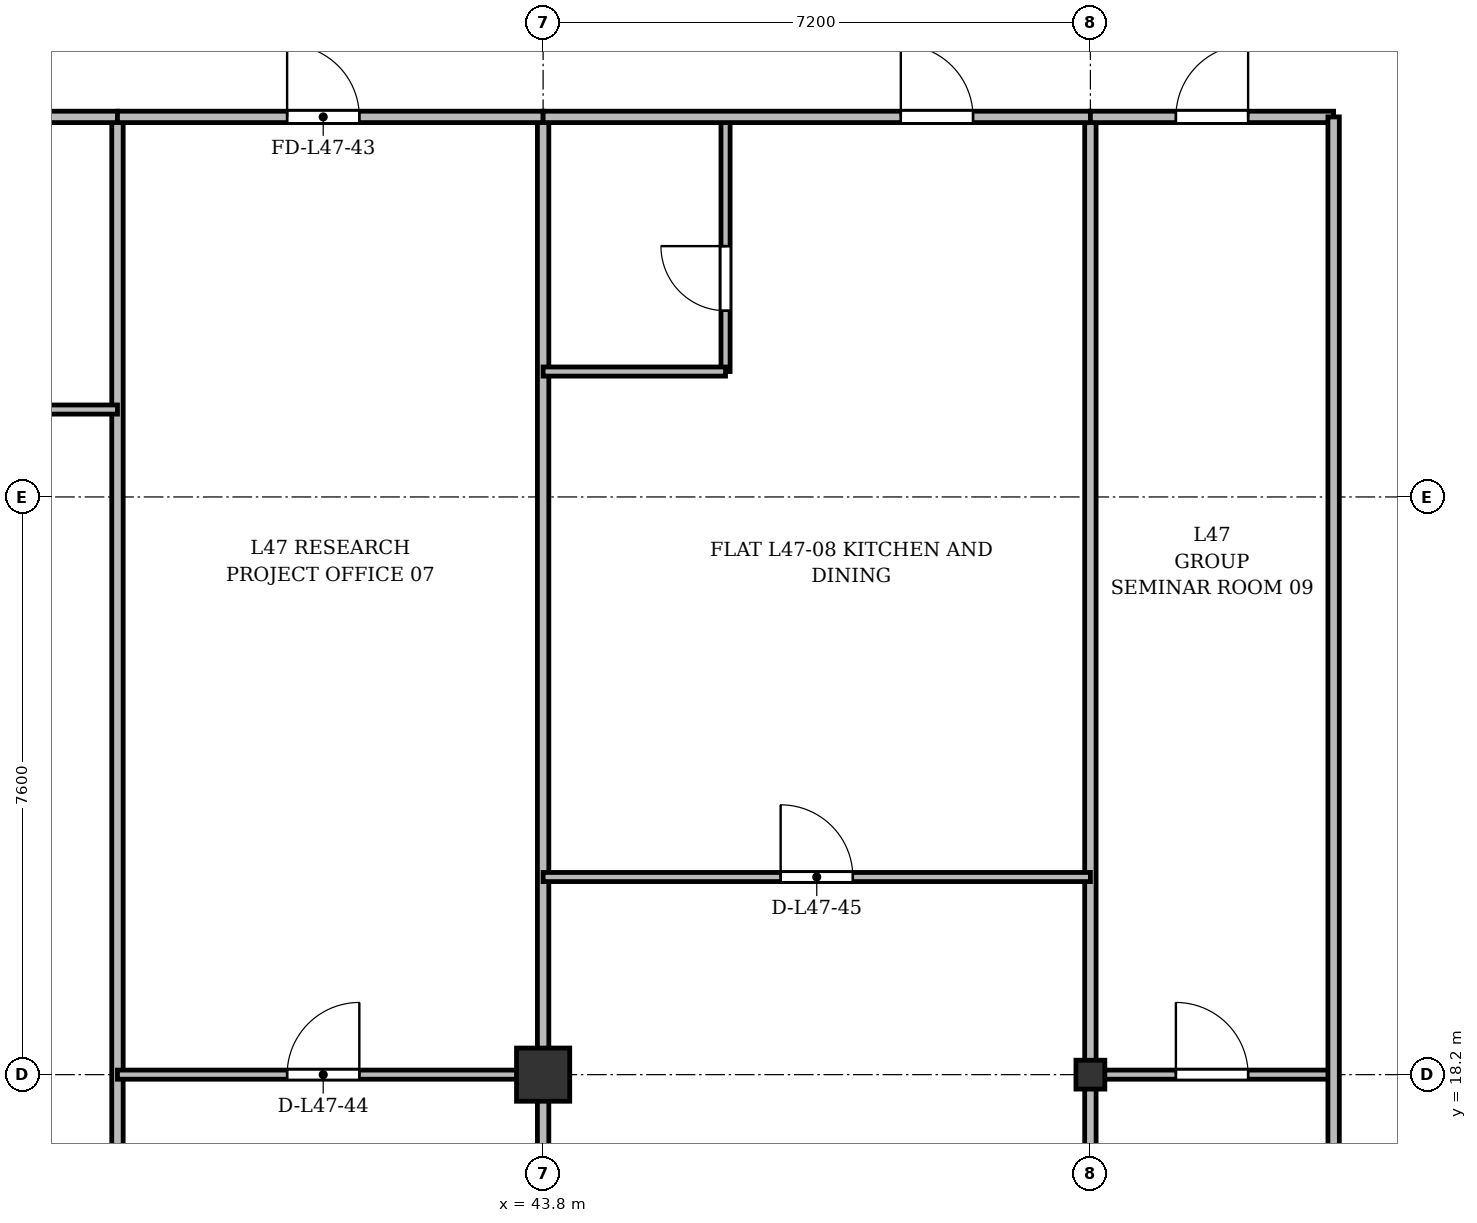
"""IFC4 building model, lengths in metres.
Left out: names, types, materials, properties, quantities, classifications, styles, units other than length and angle.
Written with IfcOpenShell. Run it as: python <this file> out.ifc"""

import sys

from ifc_helpers import new_model, si_unit, direction, frame, frame_2d, origin, origin_2d, place, context, subcontext, project, spatial, rectangle, i_section, extrude, source, transform, mapped, element, fill, save


model = new_model("IFC4")
c1 = context("Model", 3, precision=1e-05, world=origin(), true_north=direction((0.0, 1.0)))
c2 = subcontext(c1, "Body", "Model", "MODEL_VIEW")
j1 = project(units=[si_unit("LENGTHUNIT", "METRE"), si_unit("PLANEANGLEUNIT", "RADIAN")], contexts=[c1])
p1 = place(None, origin())
s1 = spatial("IfcSite", under=j1, at=p1, CompositionType="ELEMENT")
p2 = place(p1, origin())
s2 = spatial("IfcBuilding", under=s1, at=p2, CompositionType="ELEMENT")
p3 = place(p2, frame((0.0, 0.0, 178.9)))
s3 = spatial("IfcBuildingStorey", under=s2, at=p3, CompositionType="ELEMENT", Elevation=178.9)
m1 = source(origin(), c2, "Body", "SweptSolid", [
    extrude(rectangle(XDim=0.7, YDim=0.7, at=origin_2d()), origin(), (0.0, 0.0, 1.0), 3.6),
])
p4 = place(p3, frame((43.8, 18.2, 0.0), z_axis=(0.0, 0.0, 1.0), x_axis=(1.0, 0.0, 0.0)))
e1 = element("IfcColumn", 1, at=p4, inside=s3, PredefinedType="COLUMN", context=c2, shape_type="MappedRepresentation", body=[
    mapped(m1, transform((0.0, 0.0, 0.0), x_axis=(1.0, 0.0, 0.0), y_axis=(0.0, 1.0, 0.0), z_axis=(0.0, 0.0, 1.0), scale=1.0)),
])
m2 = source(origin(), c2, "Body", "SweptSolid", [
    extrude(i_section(OverallWidth=0.38, OverallDepth=0.38, WebThickness=0.02, FlangeThickness=0.03, at=origin_2d()), origin(), (0.0, 0.0, 1.0), 3.6),
])
p5 = place(p3, frame((51.0, 18.2, 0.0), z_axis=(0.0, 0.0, 1.0), x_axis=(1.0, 0.0, 0.0)))
e2 = element("IfcColumn", 2, at=p5, inside=s3, PredefinedType="COLUMN", context=c2, shape_type="MappedRepresentation", body=[
    mapped(m2, transform((0.0, 0.0, 0.0), x_axis=(1.0, 0.0, 0.0), y_axis=(0.0, 1.0, 0.0), z_axis=(0.0, 0.0, 1.0), scale=1.0)),
])
p6 = place(p3, frame((38.2, 3.525, 0.0), z_axis=(0.0, 0.0, 1.0), x_axis=(0.0, 1.0, 0.0)))
e3 = element("IfcWall", 3, at=p6, inside=s3, PredefinedType="PARTITIONING", context=c2, shape_type="SweptSolid", body=[
    extrude(rectangle(XDim=27.275, YDim=0.15, at=frame_2d((13.638, 0.0))), origin(), (0.0, 0.0, 1.0), 2.62),
])
for number, where, z_axis, x_axis in (
    (4, (43.8, 3.525, 0.0), (0.0, 0.0, 1.0), (0.0, 1.0, 0.0)),
    (5, (51.0, 3.525, 0.0), (0.0, 0.0, 1.0), (0.0, 1.0, 0.0)),
):
    element("IfcWall", number, at=place(p3, frame(where, z_axis=z_axis, x_axis=x_axis)), inside=s3, PredefinedType="PARTITIONING", context=c2, shape_type="SweptSolid", body=[
        extrude(rectangle(XDim=27.275, YDim=0.15, at=frame_2d((13.638, 0.0))), origin(), (0.0, 0.0, 1.0), 2.72),
    ])
p7 = place(p3, frame((30.6, 30.8, 0.0), z_axis=(0.0, 0.0, 1.0), x_axis=(1.0, 0.0, 0.0)))
e6 = element("IfcWall", 6, at=p7, inside=s3, PredefinedType="PARTITIONING", context=c2, shape_type="SweptSolid", body=[
    extrude(rectangle(XDim=7.6, YDim=0.15, at=frame_2d((3.8, 0.0))), origin(), (0.0, 0.0, 1.0), 2.72),
])
p8 = place(p7, frame((3.325, 0.0, 0.0)))
e7 = element("IfcOpeningElement", 7, at=p8, cuts=e6, PredefinedType="OPENING", context=c2, shape_type="SweptSolid", body=[
    extrude(rectangle(XDim=0.95, YDim=2.15, at=frame_2d((0.475, 1.075))), frame((0.0, 0.085, 0.0), z_axis=(0.0, -1.0, 0.0), x_axis=(1.0, 0.0, 0.0)), (0.0, 0.0, 1.0), 0.17),
])
p9 = place(p3, frame((30.6, 26.95, 0.0), z_axis=(0.0, 0.0, 1.0), x_axis=(1.0, 0.0, 0.0)))
e8 = element("IfcWall", 8, at=p9, inside=s3, PredefinedType="PARTITIONING", context=c2, shape_type="SweptSolid", body=[
    extrude(rectangle(XDim=7.6, YDim=0.12, at=frame_2d((3.8, 0.0))), origin(), (0.0, 0.0, 1.0), 2.72),
])
p10 = place(p9, frame((3.325, 0.0, 0.0)))
e9 = element("IfcOpeningElement", 9, at=p10, cuts=e8, PredefinedType="OPENING", context=c2, shape_type="SweptSolid", body=[
    extrude(rectangle(XDim=0.95, YDim=2.15, at=frame_2d((0.475, 1.075))), frame((0.0, 0.07, 0.0), z_axis=(0.0, -1.0, 0.0), x_axis=(1.0, 0.0, 0.0)), (0.0, 0.0, 1.0), 0.14),
])
p11 = place(p3, frame((38.2, 30.8, 0.0), z_axis=(0.0, 0.0, 1.0), x_axis=(1.0, 0.0, 0.0)))
e10 = element("IfcWall", 10, at=p11, inside=s3, PredefinedType="PARTITIONING", context=c2, shape_type="SweptSolid", body=[
    extrude(rectangle(XDim=5.6, YDim=0.15, at=frame_2d((2.8, 0.0))), origin(), (0.0, 0.0, 1.0), 2.72),
])
p12 = place(p11, frame((2.232, 0.0, 0.0)))
e11 = element("IfcOpeningElement", 11, at=p12, cuts=e10, PredefinedType="OPENING", context=c2, shape_type="SweptSolid", body=[
    extrude(rectangle(XDim=0.95, YDim=2.15, at=frame_2d((0.475, 1.075))), frame((0.0, 0.085, 0.0), z_axis=(0.0, -1.0, 0.0), x_axis=(1.0, 0.0, 0.0)), (0.0, 0.0, 1.0), 0.17),
])
p13 = place(p3, frame((38.2, 18.2, 0.0), z_axis=(0.0, 0.0, 1.0), x_axis=(1.0, 0.0, 0.0)))
e12 = element("IfcWall", 12, at=p13, inside=s3, PredefinedType="PARTITIONING", context=c2, shape_type="SweptSolid", body=[
    extrude(rectangle(XDim=5.6, YDim=0.12, at=frame_2d((2.8, 0.0))), origin(), (0.0, 0.0, 1.0), 2.62),
])
p14 = place(p13, frame((2.232, 0.0, 0.0)))
e13 = element("IfcOpeningElement", 13, at=p14, cuts=e12, PredefinedType="OPENING", context=c2, shape_type="SweptSolid", body=[
    extrude(rectangle(XDim=0.95, YDim=2.15, at=frame_2d((0.475, 1.075))), frame((0.0, 0.07, 0.0), z_axis=(0.0, -1.0, 0.0), x_axis=(1.0, 0.0, 0.0)), (0.0, 0.0, 1.0), 0.14),
])
p15 = place(p3, frame((43.8, 20.8, 0.0), z_axis=(0.0, 0.0, 1.0), x_axis=(1.0, 0.0, 0.0)))
e14 = element("IfcWall", 14, at=p15, inside=s3, PredefinedType="PARTITIONING", context=c2, shape_type="SweptSolid", body=[
    extrude(rectangle(XDim=7.2, YDim=0.12, at=frame_2d((3.6, 0.0))), origin(), (0.0, 0.0, 1.0), 2.72),
])
p16 = place(p15, frame((3.125, 0.0, 0.0)))
e15 = element("IfcOpeningElement", 15, at=p16, cuts=e14, PredefinedType="OPENING", context=c2, shape_type="SweptSolid", body=[
    extrude(rectangle(XDim=0.95, YDim=2.15, at=frame_2d((0.475, 1.075))), frame((0.0, 0.07, 0.0), z_axis=(0.0, -1.0, 0.0), x_axis=(1.0, 0.0, 0.0)), (0.0, 0.0, 1.0), 0.14),
])
p17 = place(p3, frame((46.2, 27.45, 0.0), z_axis=(0.0, 0.0, 1.0), x_axis=(0.0, 1.0, 0.0)))
e16 = element("IfcWall", 16, at=p17, inside=s3, PredefinedType="PARTITIONING", context=c2, shape_type="SweptSolid", body=[
    extrude(rectangle(XDim=3.35, YDim=0.12, at=frame_2d((1.675, 0.0))), origin(), (0.0, 0.0, 1.0), 3.22),
])
p18 = place(p17, frame((0.8, 0.0, 0.0)))
e17 = element("IfcOpeningElement", 17, at=p18, cuts=e16, PredefinedType="OPENING", context=c2, shape_type="SweptSolid", body=[
    extrude(rectangle(XDim=0.85, YDim=2.1, at=frame_2d((0.425, 1.05))), frame((0.0, 0.07, 0.0), z_axis=(0.0, -1.0, 0.0), x_axis=(1.0, 0.0, 0.0)), (0.0, 0.0, 1.0), 0.14),
])
p19 = place(p3, frame((43.8, 27.45, 0.0), z_axis=(0.0, 0.0, 1.0), x_axis=(1.0, 0.0, 0.0)))
e18 = element("IfcWall", 18, at=p19, inside=s3, PredefinedType="PARTITIONING", context=c2, shape_type="SweptSolid", body=[
    extrude(rectangle(XDim=2.4, YDim=0.12, at=frame_2d((1.2, 0.0))), origin(), (0.0, 0.0, 1.0), 2.72),
])
p20 = place(p3, frame((43.8, 30.8, 0.0), z_axis=(0.0, 0.0, 1.0), x_axis=(1.0, 0.0, 0.0)))
e19 = element("IfcWall", 19, at=p20, inside=s3, PredefinedType="PARTITIONING", context=c2, shape_type="SweptSolid", body=[
    extrude(rectangle(XDim=7.2, YDim=0.15, at=frame_2d((3.6, 0.0))), origin(), (0.0, 0.0, 1.0), 2.72),
])
p21 = place(p20, frame((4.706, 0.0, 0.0)))
e20 = element("IfcOpeningElement", 20, at=p21, cuts=e19, PredefinedType="OPENING", context=c2, shape_type="SweptSolid", body=[
    extrude(rectangle(XDim=0.95, YDim=2.15, at=frame_2d((0.475, 1.075))), frame((0.0, 0.085, 0.0), z_axis=(0.0, -1.0, 0.0), x_axis=(1.0, 0.0, 0.0)), (0.0, 0.0, 1.0), 0.17),
])
p22 = place(p3, frame((51.0, 30.8, 0.0), z_axis=(0.0, 0.0, 1.0), x_axis=(1.0, 0.0, 0.0)))
e21 = element("IfcWall", 21, at=p22, inside=s3, PredefinedType="PARTITIONING", context=c2, shape_type="SweptSolid", body=[
    extrude(rectangle(XDim=3.2, YDim=0.15, at=frame_2d((1.6, 0.0))), origin(), (0.0, 0.0, 1.0), 2.72),
])
p23 = place(p22, frame((1.125, 0.0, 0.0)))
e22 = element("IfcOpeningElement", 22, at=p23, cuts=e21, PredefinedType="OPENING", context=c2, shape_type="SweptSolid", body=[
    extrude(rectangle(XDim=0.95, YDim=2.15, at=frame_2d((0.475, 1.075))), frame((0.0, 0.085, 0.0), z_axis=(0.0, -1.0, 0.0), x_axis=(1.0, 0.0, 0.0)), (0.0, 0.0, 1.0), 0.17),
])
p24 = place(p3, frame((51.0, 18.2, 0.0), z_axis=(0.0, 0.0, 1.0), x_axis=(1.0, 0.0, 0.0)))
e23 = element("IfcWall", 23, at=p24, inside=s3, PredefinedType="PARTITIONING", context=c2, shape_type="SweptSolid", body=[
    extrude(rectangle(XDim=3.2, YDim=0.12, at=frame_2d((1.6, 0.0))), origin(), (0.0, 0.0, 1.0), 2.62),
])
p25 = place(p24, frame((1.125, 0.0, 0.0)))
e24 = element("IfcOpeningElement", 24, at=p25, cuts=e23, PredefinedType="OPENING", context=c2, shape_type="SweptSolid", body=[
    extrude(rectangle(XDim=0.95, YDim=2.15, at=frame_2d((0.475, 1.075))), frame((0.0, 0.07, 0.0), z_axis=(0.0, -1.0, 0.0), x_axis=(1.0, 0.0, 0.0)), (0.0, 0.0, 1.0), 0.14),
])
p26 = place(p3, frame((54.2, 3.525, 0.0), z_axis=(0.0, 0.0, 1.0), x_axis=(0.0, 1.0, 0.0)))
e25 = element("IfcWall", 25, at=p26, inside=s3, PredefinedType="PARTITIONING", context=c2, shape_type="SweptSolid", body=[
    extrude(rectangle(XDim=27.275, YDim=0.15, at=frame_2d((13.638, 0.0))), origin(), (0.0, 0.0, 1.0), 2.62),
])
m3 = source(origin(), c2, "Body", "SweptSolid", [
    extrude(rectangle(XDim=0.95, YDim=2.15, at=frame_2d((0.475, 1.075))), frame((0.0, 0.025, 0.0), z_axis=(0.0, -1.0, 0.0), x_axis=(1.0, 0.0, 0.0)), (0.0, 0.0, 1.0), 0.05),
])
p27 = place(p12, origin())
e26 = element("IfcDoor", 26, at=p27, inside=s3, OperationType="SINGLE_SWING_LEFT", PredefinedType="DOOR", context=c2, shape_type="MappedRepresentation", body=[
    mapped(m3, transform((0.0, 0.0, 0.0), x_axis=(1.0, 0.0, 0.0), y_axis=(0.0, 1.0, 0.0), z_axis=(0.0, 0.0, 1.0), scale=1.0)),
])
fill(e11, e26)
p28 = place(p14, origin())
e27 = element("IfcDoor", 27, at=p28, inside=s3, OperationType="SINGLE_SWING_RIGHT", PredefinedType="DOOR", context=c2, shape_type="MappedRepresentation", body=[
    mapped(m3, transform((0.0, 0.0, 0.0), x_axis=(1.0, 0.0, 0.0), y_axis=(0.0, 1.0, 0.0), z_axis=(0.0, 0.0, 1.0), scale=1.0)),
])
fill(e13, e27)
p29 = place(p16, origin())
e28 = element("IfcDoor", 28, at=p29, inside=s3, OperationType="SINGLE_SWING_LEFT", PredefinedType="DOOR", context=c2, shape_type="MappedRepresentation", body=[
    mapped(m3, transform((0.0, 0.0, 0.0), x_axis=(1.0, 0.0, 0.0), y_axis=(0.0, 1.0, 0.0), z_axis=(0.0, 0.0, 1.0), scale=1.0)),
])
fill(e15, e28)
m4 = source(origin(), c2, "Body", "SweptSolid", [
    extrude(rectangle(XDim=0.85, YDim=2.1, at=frame_2d((0.425, 1.05))), frame((0.0, 0.025, 0.0), z_axis=(0.0, -1.0, 0.0), x_axis=(1.0, 0.0, 0.0)), (0.0, 0.0, 1.0), 0.05),
])
p30 = place(p18, origin())
e29 = element("IfcDoor", 29, at=p30, inside=s3, OperationType="SINGLE_SWING_RIGHT", PredefinedType="DOOR", context=c2, shape_type="MappedRepresentation", body=[
    mapped(m4, transform((0.0, 0.0, 0.0), x_axis=(1.0, 0.0, 0.0), y_axis=(0.0, 1.0, 0.0), z_axis=(0.0, 0.0, 1.0), scale=1.0)),
])
fill(e17, e29)
p31 = place(p21, origin())
e30 = element("IfcDoor", 30, at=p31, inside=s3, OperationType="SINGLE_SWING_LEFT", PredefinedType="DOOR", context=c2, shape_type="MappedRepresentation", body=[
    mapped(m3, transform((0.0, 0.0, 0.0), x_axis=(1.0, 0.0, 0.0), y_axis=(0.0, 1.0, 0.0), z_axis=(0.0, 0.0, 1.0), scale=1.0)),
])
fill(e20, e30)
p32 = place(p23, origin())
e31 = element("IfcDoor", 31, at=p32, inside=s3, OperationType="SINGLE_SWING_RIGHT", PredefinedType="DOOR", context=c2, shape_type="MappedRepresentation", body=[
    mapped(m3, transform((0.0, 0.0, 0.0), x_axis=(1.0, 0.0, 0.0), y_axis=(0.0, 1.0, 0.0), z_axis=(0.0, 0.0, 1.0), scale=1.0)),
])
fill(e22, e31)
p33 = place(p25, origin())
e32 = element("IfcDoor", 32, at=p33, inside=s3, OperationType="SINGLE_SWING_LEFT", PredefinedType="DOOR", context=c2, shape_type="MappedRepresentation", body=[
    mapped(m3, transform((0.0, 0.0, 0.0), x_axis=(1.0, 0.0, 0.0), y_axis=(0.0, 1.0, 0.0), z_axis=(0.0, 0.0, 1.0), scale=1.0)),
])
fill(e24, e32)
save(model, sys.argv[1])
